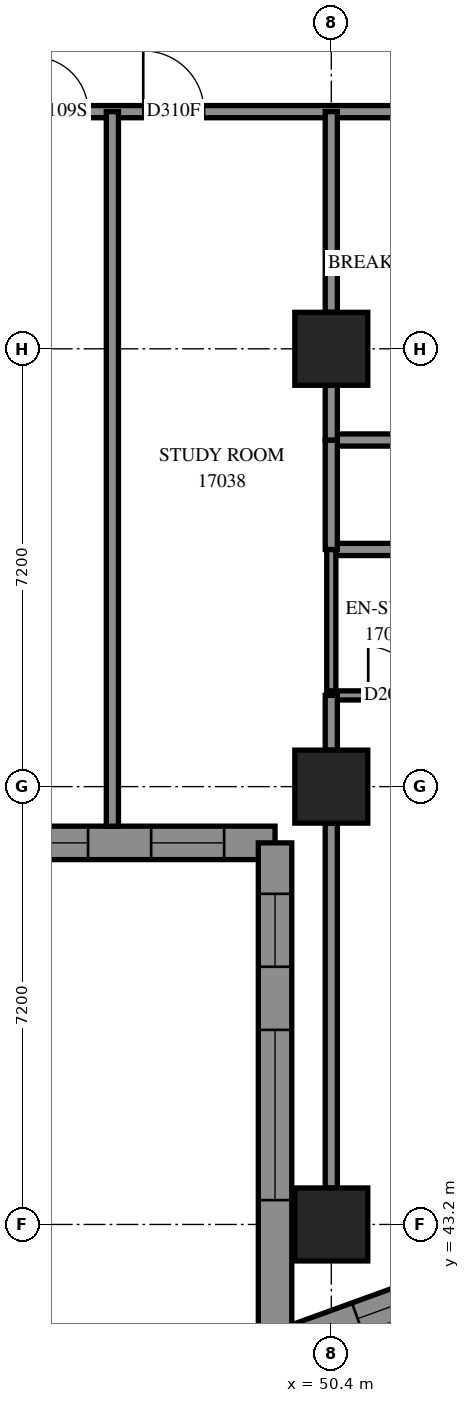
"""IFC4 building model, lengths in metres.
Left out: names, types, materials, properties, quantities, classifications, styles, units other than length and angle.
Written with IfcOpenShell. Run it as: python <this file> out.ifc"""

import sys

from ifc_helpers import new_model, si_unit, direction, frame, frame_2d, origin, origin_2d, place, context, subcontext, project, spatial, polyline, rectangle, outline, extrude, element, fill, save


model = new_model("IFC4")
c1 = context("Model", 3, precision=1e-05, world=origin(), true_north=direction((0.0, 1.0)))
c2 = subcontext(c1, "Body", "Model", "MODEL_VIEW")
j1 = project(units=[si_unit("LENGTHUNIT", "METRE"), si_unit("PLANEANGLEUNIT", "RADIAN")], contexts=[c1])
p1 = place(None, origin())
s1 = spatial("IfcSite", under=j1, at=p1, CompositionType="ELEMENT")
p2 = place(p1, origin())
s2 = spatial("IfcBuilding", under=s1, at=p2, CompositionType="ELEMENT")
p3 = place(p2, frame((0.0, 0.0, 64.4)))
s3 = spatial("IfcBuildingStorey", under=s2, at=p3, CompositionType="ELEMENT", Elevation=64.4)
for number, where, z_axis, x_axis in (
    (1, (50.4, 43.2, 0.0), (0.0, 0.0, 1.0), (1.0, 0.0, 0.0)),
    (2, (50.4, 50.4, 0.0), (0.0, 0.0, 1.0), (1.0, 0.0, 0.0)),
    (3, (50.4, 57.6, 0.0), (0.0, 0.0, 1.0), (1.0, 0.0, 0.0)),
):
    element("IfcColumn", number, at=place(p3, frame(where, z_axis=z_axis, x_axis=x_axis)), inside=s3, PredefinedType="COLUMN", context=c2, shape_type="SweptSolid", body=[
        extrude(rectangle(XDim=1.2, YDim=1.2, at=origin_2d()), origin(), (0.0, 0.0, 1.0), 3.1),
    ])
p4 = place(p3, frame((42.275, 49.475, 0.0), z_axis=(0.0, 0.0, 1.0), x_axis=(1.0, 0.0, 0.0)))
e4 = element("IfcWall", 4, at=p4, inside=s3, PredefinedType="SOLIDWALL", context=c2, shape_type="SweptSolid", body=[
    extrude(outline(polyline([(-0.275, -0.275), (6.925, -0.275), (7.475, 0.275), (0.275, 0.275), (-0.275, -0.275)])), origin(), (0.0, 0.0, 1.0), 3.1),
])
p5 = place(p4, frame((1.325, 0.0, 0.5)))
e5 = element("IfcOpeningElement", 5, at=p5, cuts=e4, PredefinedType="OPENING", context=c2, shape_type="SweptSolid", body=[
    extrude(rectangle(XDim=2.8, YDim=2.45, at=frame_2d((1.4, 1.225))), frame((0.0, 0.285, 0.0), z_axis=(0.0, -1.0, 0.0), x_axis=(1.0, 0.0, 0.0)), (0.0, 0.0, 1.0), 0.57),
])
p6 = place(p4, frame((5.162, 0.0, 0.5)))
e6 = element("IfcOpeningElement", 6, at=p6, cuts=e4, PredefinedType="OPENING", context=c2, shape_type="SweptSolid", body=[
    extrude(rectangle(XDim=1.2, YDim=2.45, at=frame_2d((0.6, 1.225))), frame((0.0, 0.285, 0.0), z_axis=(0.0, -1.0, 0.0), x_axis=(1.0, 0.0, 0.0)), (0.0, 0.0, 1.0), 0.57),
])
p7 = place(p3, frame((49.475, 49.475, 0.0), z_axis=(0.0, 0.0, 1.0), x_axis=(0.0, -1.0, 0.0)))
e7 = element("IfcWall", 7, at=p7, inside=s3, PredefinedType="SOLIDWALL", context=c2, shape_type="SweptSolid", body=[
    extrude(outline(polyline([(0.275, -0.275), (8.708, -0.275), (7.924, 0.275), (-0.275, 0.275), (0.275, -0.275)])), origin(), (0.0, 0.0, 1.0), 3.1),
])
p8 = place(p7, frame((3.075, 0.0, 0.5)))
e8 = element("IfcOpeningElement", 8, at=p8, cuts=e7, PredefinedType="OPENING", context=c2, shape_type="SweptSolid", body=[
    extrude(rectangle(XDim=2.8, YDim=2.45, at=frame_2d((1.4, 1.225))), frame((0.0, 0.285, 0.0), z_axis=(0.0, -1.0, 0.0), x_axis=(1.0, 0.0, 0.0)), (0.0, 0.0, 1.0), 0.57),
])
p9 = place(p7, frame((0.838, 0.0, 0.5)))
e9 = element("IfcOpeningElement", 9, at=p9, cuts=e7, PredefinedType="OPENING", context=c2, shape_type="SweptSolid", body=[
    extrude(rectangle(XDim=1.2, YDim=2.45, at=frame_2d((0.6, 1.225))), frame((0.0, 0.285, 0.0), z_axis=(0.0, -1.0, 0.0), x_axis=(1.0, 0.0, 0.0)), (0.0, 0.0, 1.0), 0.57),
])
p10 = place(p3, frame((49.475, 41.159, 0.0), z_axis=(0.0, 0.0, 1.0), x_axis=(0.9402923967, 0.3403677552, 0.0)))
e10 = element("IfcWall", 10, at=p10, inside=s3, PredefinedType="SOLIDWALL", context=c2, shape_type="SweptSolid", body=[
    extrude(outline(polyline([(-0.392, -0.275), (3.231, -0.275), (3.38, 0.275), (0.392, 0.275), (-0.392, -0.275)])), origin(), (0.0, 0.0, 1.0), 3.1),
])
p11 = place(p10, frame((1.444, 0.0, 0.5)))
e11 = element("IfcOpeningElement", 11, at=p11, cuts=e10, PredefinedType="OPENING", context=c2, shape_type="SweptSolid", body=[
    extrude(rectangle(XDim=1.2, YDim=2.45, at=frame_2d((0.6, 1.225))), frame((0.0, 0.285, 0.0), z_axis=(0.0, -1.0, 0.0), x_axis=(1.0, 0.0, 0.0)), (0.0, 0.0, 1.0), 0.57),
])
p12 = place(p3, frame((28.8, 61.5, 0.0), z_axis=(0.0, 0.0, 1.0), x_axis=(1.0, 0.0, 0.0)))
e12 = element("IfcWall", 12, at=p12, inside=s3, PredefinedType="PARTITIONING", context=c2, shape_type="SweptSolid", body=[
    extrude(rectangle(XDim=24.3, YDim=0.2, at=frame_2d((12.15, 0.0))), origin(), (0.0, 0.0, 1.0), 3.1),
])
p13 = place(p12, frame((3.899, 0.0, 0.0)))
e13 = element("IfcOpeningElement", 13, at=p13, cuts=e12, PredefinedType="OPENING", context=c2, shape_type="SweptSolid", body=[
    extrude(rectangle(XDim=0.9, YDim=2.1, at=frame_2d((0.45, 1.05))), frame((0.0, 0.11, 0.0), z_axis=(0.0, -1.0, 0.0), x_axis=(1.0, 0.0, 0.0)), (0.0, 0.0, 1.0), 0.22),
])
p14 = place(p12, frame((9.5, 0.0, 0.0)))
e14 = element("IfcOpeningElement", 14, at=p14, cuts=e12, PredefinedType="OPENING", context=c2, shape_type="SweptSolid", body=[
    extrude(rectangle(XDim=0.9, YDim=2.1, at=frame_2d((0.45, 1.05))), frame((0.0, 0.11, 0.0), z_axis=(0.0, -1.0, 0.0), x_axis=(1.0, 0.0, 0.0)), (0.0, 0.0, 1.0), 0.22),
])
p15 = place(p12, frame((11.307, 0.0, 0.0)))
e15 = element("IfcOpeningElement", 15, at=p15, cuts=e12, PredefinedType="OPENING", context=c2, shape_type="SweptSolid", body=[
    extrude(rectangle(XDim=1.0, YDim=2.1, at=frame_2d((0.5, 1.05))), frame((0.0, 0.11, 0.0), z_axis=(0.0, -1.0, 0.0), x_axis=(1.0, 0.0, 0.0)), (0.0, 0.0, 1.0), 0.22),
])
p16 = place(p12, frame((16.7, 0.0, 0.0)))
e16 = element("IfcOpeningElement", 16, at=p16, cuts=e12, PredefinedType="OPENING", context=c2, shape_type="SweptSolid", body=[
    extrude(rectangle(XDim=0.9, YDim=2.1, at=frame_2d((0.45, 1.05))), frame((0.0, 0.11, 0.0), z_axis=(0.0, -1.0, 0.0), x_axis=(1.0, 0.0, 0.0)), (0.0, 0.0, 1.0), 0.22),
])
p17 = place(p12, frame((18.508, 0.0, 0.0)))
e17 = element("IfcOpeningElement", 17, at=p17, cuts=e12, PredefinedType="OPENING", context=c2, shape_type="SweptSolid", body=[
    extrude(rectangle(XDim=1.0, YDim=2.1, at=frame_2d((0.5, 1.05))), frame((0.0, 0.11, 0.0), z_axis=(0.0, -1.0, 0.0), x_axis=(1.0, 0.0, 0.0)), (0.0, 0.0, 1.0), 0.22),
])
p18 = place(p12, frame((23.033, 0.0, 0.0)))
e18 = element("IfcOpeningElement", 18, at=p18, cuts=e12, PredefinedType="OPENING", context=c2, shape_type="SweptSolid", body=[
    extrude(rectangle(XDim=1.0, YDim=2.1, at=frame_2d((0.5, 1.05))), frame((0.0, 0.11, 0.0), z_axis=(0.0, -1.0, 0.0), x_axis=(1.0, 0.0, 0.0)), (0.0, 0.0, 1.0), 0.22),
])
p19 = place(p3, frame((46.8, 49.75, 0.0), z_axis=(0.0, 0.0, 1.0), x_axis=(0.0, 1.0, 0.0)))
e19 = element("IfcWall", 19, at=p19, inside=s3, PredefinedType="PARTITIONING", context=c2, shape_type="SweptSolid", body=[
    extrude(rectangle(XDim=11.75, YDim=0.2, at=frame_2d((5.875, 0.0))), origin(), (0.0, 0.0, 1.0), 3.1),
])
p20 = place(p3, frame((50.4, 43.8, 0.0), z_axis=(0.0, 0.0, 1.0), x_axis=(0.0, 1.0, 0.0)))
e20 = element("IfcWall", 20, at=p20, inside=s3, PredefinedType="PARTITIONING", context=c2, shape_type="SweptSolid", body=[
    extrude(rectangle(XDim=6.0, YDim=0.2, at=frame_2d((3.0, 0.0))), origin(), (0.0, 0.0, 1.0), 2.6),
])
p21 = place(p3, frame((50.4, 54.3, 0.0), z_axis=(0.0, 0.0, 1.0), x_axis=(1.0, 0.0, 0.0)))
e21 = element("IfcWall", 21, at=p21, inside=s3, PredefinedType="PARTITIONING", context=c2, shape_type="SweptSolid", body=[
    extrude(rectangle(XDim=4.7, YDim=0.2, at=frame_2d((2.35, 0.0))), origin(), (0.0, 0.0, 1.0), 3.1),
])
p22 = place(p21, frame((2.3, 0.0, 0.0)))
e22 = element("IfcOpeningElement", 22, at=p22, cuts=e21, PredefinedType="OPENING", context=c2, shape_type="SweptSolid", body=[
    extrude(rectangle(XDim=0.9, YDim=2.1, at=frame_2d((0.45, 1.05))), frame((0.0, 0.11, 0.0), z_axis=(0.0, -1.0, 0.0), x_axis=(1.0, 0.0, 0.0)), (0.0, 0.0, 1.0), 0.22),
])
p23 = place(p3, frame((50.4, 58.2, 0.0), z_axis=(0.0, 0.0, 1.0), x_axis=(0.0, 1.0, 0.0)))
e23 = element("IfcWall", 23, at=p23, inside=s3, PredefinedType="PARTITIONING", context=c2, shape_type="SweptSolid", body=[
    extrude(rectangle(XDim=3.3, YDim=0.2, at=frame_2d((1.65, 0.0))), origin(), (0.0, 0.0, 1.0), 3.1),
])
p24 = place(p3, frame((50.4, 56.1, 0.0), z_axis=(0.0, 0.0, 1.0), x_axis=(1.0, 0.0, 0.0)))
e24 = element("IfcWall", 24, at=p24, inside=s3, PredefinedType="PARTITIONING", context=c2, shape_type="SweptSolid", body=[
    extrude(rectangle(XDim=2.7, YDim=0.2, at=frame_2d((1.35, 0.0))), origin(), (0.0, 0.0, 1.0), 3.1),
])
p25 = place(p3, frame((50.4, 51.9, 0.0), z_axis=(0.0, 0.0, 1.0), x_axis=(0.0, 1.0, 0.0)))
e25 = element("IfcWall", 25, at=p25, inside=s3, PredefinedType="PARTITIONING", context=c2, shape_type="SweptSolid", body=[
    extrude(rectangle(XDim=2.4, YDim=0.15, at=frame_2d((1.2, 0.0))), origin(), (0.0, 0.0, 1.0), 3.1),
])
p26 = place(p3, frame((50.4, 51.9, 0.0), z_axis=(0.0, 0.0, 1.0), x_axis=(1.0, 0.0, 0.0)))
e26 = element("IfcWall", 26, at=p26, inside=s3, PredefinedType="PARTITIONING", context=c2, shape_type="SweptSolid", body=[
    extrude(rectangle(XDim=1.9, YDim=0.15, at=frame_2d((0.95, 0.0))), origin(), (0.0, 0.0, 1.0), 3.1),
])
p27 = place(p26, frame((0.607, 0.0, 0.0)))
e27 = element("IfcOpeningElement", 27, at=p27, cuts=e26, PredefinedType="OPENING", context=c2, shape_type="SweptSolid", body=[
    extrude(rectangle(XDim=0.8, YDim=2.1, at=frame_2d((0.4, 1.05))), frame((0.0, 0.085, 0.0), z_axis=(0.0, -1.0, 0.0), x_axis=(1.0, 0.0, 0.0)), (0.0, 0.0, 1.0), 0.17),
])
p28 = place(p3, frame((50.4, 54.3, 0.0), z_axis=(0.0, 0.0, 1.0), x_axis=(0.0, 1.0, 0.0)))
e28 = element("IfcWall", 28, at=p28, inside=s3, PredefinedType="PARTITIONING", context=c2, shape_type="SweptSolid", body=[
    extrude(rectangle(XDim=1.8, YDim=0.2, at=frame_2d((0.9, 0.0))), origin(), (0.0, 0.0, 1.0), 3.1),
])
for number, where, z_axis, x_axis in (
    (29, (50.4, 51.0, 0.0), (0.0, 0.0, 1.0), (0.0, 1.0, 0.0)),
    (30, (50.4, 56.1, 0.0), (0.0, 0.0, 1.0), (0.0, 1.0, 0.0)),
):
    element("IfcWall", number, at=place(p3, frame(where, z_axis=z_axis, x_axis=x_axis)), inside=s3, PredefinedType="PARTITIONING", context=c2, shape_type="SweptSolid", body=[
        extrude(rectangle(XDim=0.9, YDim=0.2, at=frame_2d((0.45, 0.0))), origin(), (0.0, 0.0, 1.0), 3.1),
    ])
p29 = place(p5, origin())
e31 = element("IfcWindow", 31, at=p29, inside=s3, PartitioningType="SINGLE_PANEL", PredefinedType="WINDOW", context=c2, shape_type="SweptSolid", body=[
    extrude(rectangle(XDim=2.8, YDim=2.45, at=frame_2d((1.4, 1.225))), frame((0.0, 0.155, 0.0), z_axis=(0.0, -1.0, 0.0), x_axis=(1.0, 0.0, 0.0)), (0.0, 0.0, 1.0), 0.06),
])
fill(e5, e31)
p30 = place(p6, origin())
e32 = element("IfcWindow", 32, at=p30, inside=s3, PartitioningType="SINGLE_PANEL", PredefinedType="WINDOW", context=c2, shape_type="SweptSolid", body=[
    extrude(rectangle(XDim=1.2, YDim=2.45, at=frame_2d((0.6, 1.225))), frame((0.0, 0.155, 0.0), z_axis=(0.0, -1.0, 0.0), x_axis=(1.0, 0.0, 0.0)), (0.0, 0.0, 1.0), 0.06),
])
fill(e6, e32)
p31 = place(p8, origin())
e33 = element("IfcWindow", 33, at=p31, inside=s3, PartitioningType="SINGLE_PANEL", PredefinedType="WINDOW", context=c2, shape_type="SweptSolid", body=[
    extrude(rectangle(XDim=2.8, YDim=2.45, at=frame_2d((1.4, 1.225))), frame((0.0, 0.155, 0.0), z_axis=(0.0, -1.0, 0.0), x_axis=(1.0, 0.0, 0.0)), (0.0, 0.0, 1.0), 0.06),
])
fill(e8, e33)
p32 = place(p9, origin())
e34 = element("IfcWindow", 34, at=p32, inside=s3, PartitioningType="SINGLE_PANEL", PredefinedType="WINDOW", context=c2, shape_type="SweptSolid", body=[
    extrude(rectangle(XDim=1.2, YDim=2.45, at=frame_2d((0.6, 1.225))), frame((0.0, 0.155, 0.0), z_axis=(0.0, -1.0, 0.0), x_axis=(1.0, 0.0, 0.0)), (0.0, 0.0, 1.0), 0.06),
])
fill(e9, e34)
p33 = place(p11, origin())
e35 = element("IfcWindow", 35, at=p33, inside=s3, PartitioningType="SINGLE_PANEL", PredefinedType="WINDOW", context=c2, shape_type="SweptSolid", body=[
    extrude(rectangle(XDim=1.2, YDim=2.45, at=frame_2d((0.6, 1.225))), frame((0.0, 0.155, 0.0), z_axis=(0.0, -1.0, 0.0), x_axis=(1.0, 0.0, 0.0)), (0.0, 0.0, 1.0), 0.06),
])
fill(e11, e35)
p34 = place(p16, origin())
e36 = element("IfcDoor", 36, at=p34, inside=s3, OperationType="SINGLE_SWING_LEFT", PredefinedType="DOOR", context=c2, shape_type="SweptSolid", body=[
    extrude(rectangle(XDim=0.9, YDim=2.1, at=frame_2d((0.45, 1.05))), frame((0.0, 0.025, 0.0), z_axis=(0.0, -1.0, 0.0), x_axis=(1.0, 0.0, 0.0)), (0.0, 0.0, 1.0), 0.05),
])
fill(e16, e36)
p35 = place(p17, origin())
e37 = element("IfcDoor", 37, at=p35, inside=s3, OperationType="SINGLE_SWING_RIGHT", PredefinedType="DOOR", context=c2, shape_type="SweptSolid", body=[
    extrude(rectangle(XDim=1.0, YDim=2.1, at=frame_2d((0.5, 1.05))), frame((0.0, 0.025, 0.0), z_axis=(0.0, -1.0, 0.0), x_axis=(1.0, 0.0, 0.0)), (0.0, 0.0, 1.0), 0.05),
])
fill(e17, e37)
p36 = place(p27, origin())
e38 = element("IfcDoor", 38, at=p36, inside=s3, OperationType="SINGLE_SWING_RIGHT", PredefinedType="DOOR", context=c2, shape_type="SweptSolid", body=[
    extrude(rectangle(XDim=0.8, YDim=2.1, at=frame_2d((0.4, 1.05))), frame((0.0, 0.025, 0.0), z_axis=(0.0, -1.0, 0.0), x_axis=(1.0, 0.0, 0.0)), (0.0, 0.0, 1.0), 0.05),
])
fill(e27, e38)
save(model, sys.argv[1])
